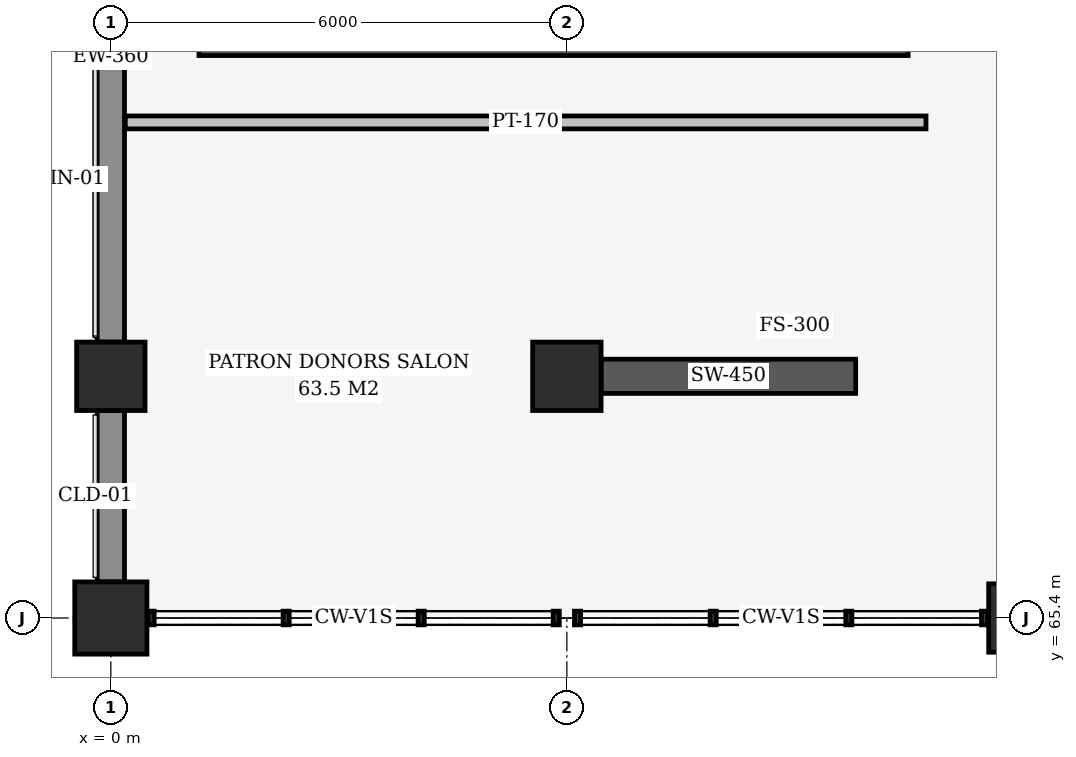
"""IFC4 building model, lengths in metres.
Left out: names, types, materials, properties, quantities, classifications, styles, units other than length and angle.
Written with IfcOpenShell. Run it as: python <this file> out.ifc"""

import sys

from ifc_helpers import new_model, si_unit, direction, frame, frame_2d, origin, origin_2d, place, context, subcontext, project, spatial, rectangle, extrude, element, save


model = new_model("IFC4")
c1 = context("Model", 3, precision=1e-05, world=origin(), true_north=direction((0.0, 1.0)))
c2 = subcontext(c1, "Body", "Model", "MODEL_VIEW")
j1 = project(units=[si_unit("LENGTHUNIT", "METRE"), si_unit("PLANEANGLEUNIT", "RADIAN")], contexts=[c1])
p1 = place(None, origin())
s1 = spatial("IfcSite", under=j1, at=p1, CompositionType="ELEMENT")
p2 = place(p1, origin())
s2 = spatial("IfcBuilding", under=s1, at=p2, CompositionType="ELEMENT")
p3 = place(p2, frame((0.0, 0.0, 9.3)))
s3 = spatial("IfcBuildingStorey", under=s2, at=p3, CompositionType="ELEMENT", Elevation=9.3)
p4 = place(p3, frame((0.0, 65.4, 0.0), z_axis=(0.0, 0.0, 1.0), x_axis=(1.0, 0.0, 0.0)))
e1 = element("IfcColumn", 1, at=p4, inside=s3, PredefinedType="COLUMN", context=c2, shape_type="SweptSolid", body=[
    extrude(rectangle(XDim=0.95, YDim=0.95, at=origin_2d()), origin(), (0.0, 0.0, 1.0), 4.5),
])
for number, where, z_axis, x_axis in (
    (2, (12.0, 65.4, 0.0), (0.0, 0.0, 1.0), (1.0, 0.0, 0.0)),
    (3, (0.0, 68.58, 0.0), (0.0, 0.0, 1.0), (1.0, 0.0, 0.0)),
    (4, (6.0, 68.58, 0.0), (0.0, 0.0, 1.0), (1.0, 0.0, 0.0)),
):
    element("IfcColumn", number, at=place(p3, frame(where, z_axis=z_axis, x_axis=x_axis)), inside=s3, PredefinedType="COLUMN", context=c2, shape_type="SweptSolid", body=[
        extrude(rectangle(XDim=0.9, YDim=0.9, at=origin_2d()), origin(), (0.0, 0.0, 1.0), 4.5),
    ])
p5 = place(p3, frame((6.45, 68.58, 0.0), z_axis=(0.0, 0.0, 1.0), x_axis=(1.0, 0.0, 0.0)))
e5 = element("IfcWall", 5, at=p5, inside=s3, PredefinedType="SHEAR", context=c2, shape_type="SweptSolid", body=[
    extrude(rectangle(XDim=3.35, YDim=0.45, at=frame_2d((1.675, 0.0))), origin(), (0.0, 0.0, 1.0), 3.505),
])
p6 = place(p3, frame((0.0, 65.875, 0.0), z_axis=(0.0, 0.0, 1.0), x_axis=(0.0, 1.0, 0.0)))
e6 = element("IfcWall", 6, at=p6, inside=s3, PredefinedType="SOLIDWALL", context=c2, shape_type="SweptSolid", body=[
    extrude(rectangle(XDim=2.255, YDim=0.36, at=frame_2d((1.127, 0.0))), origin(), (0.0, 0.0, 1.0), 3.568),
])
p7 = place(p3, frame((0.0, 69.03, 0.0), z_axis=(0.0, 0.0, 1.0), x_axis=(0.0, 1.0, 0.0)))
e7 = element("IfcWall", 7, at=p7, inside=s3, PredefinedType="SOLIDWALL", context=c2, shape_type="SweptSolid", body=[
    extrude(rectangle(XDim=13.395, YDim=0.36, at=frame_2d((6.698, 0.0))), origin(), (0.0, 0.0, 1.0), 3.569),
])
p8 = place(p7, frame((5.548, 0.0, 0.85)))
e8 = element("IfcOpeningElement", 8, at=p8, cuts=e7, PredefinedType="OPENING", context=c2, shape_type="SweptSolid", body=[
    extrude(rectangle(XDim=2.3, YDim=1.6, at=frame_2d((1.15, 0.8))), frame((0.0, 0.19, 0.0), z_axis=(0.0, -1.0, 0.0), x_axis=(1.0, 0.0, 0.0)), (0.0, 0.0, 1.0), 0.38),
])
p9 = place(p3, frame((1.16, 72.945, 0.0), z_axis=(0.0, 0.0, 1.0), x_axis=(1.0, 0.0, 0.0)))
e9 = element("IfcWall", 9, at=p9, inside=s3, PredefinedType="SHEAR", context=c2, shape_type="SweptSolid", body=[
    extrude(rectangle(XDim=9.33, YDim=0.29, at=frame_2d((4.665, 0.0))), origin(), (0.0, 0.0, 1.0), 4.2),
])
p10 = place(p3, frame((0.19, 71.92, 0.0), z_axis=(0.0, 0.0, 1.0), x_axis=(1.0, 0.0, 0.0)))
e10 = element("IfcWall", 10, at=p10, inside=s3, PredefinedType="PARTITIONING", context=c2, shape_type="SweptSolid", body=[
    extrude(rectangle(XDim=10.535, YDim=0.17, at=frame_2d((5.268, 0.0))), origin(), (0.0, 0.0, 1.0), 4.18),
])
save(model, sys.argv[1])
